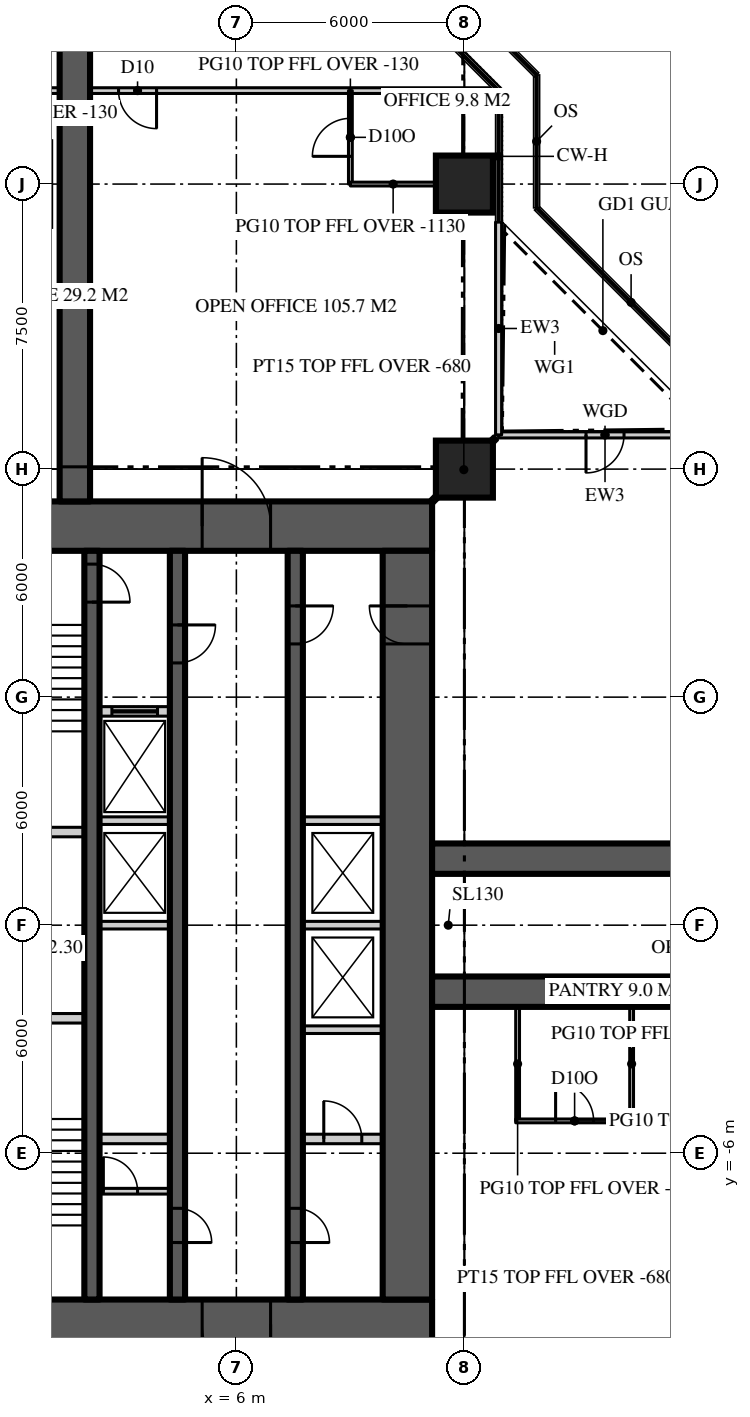
"""IFC4 building model, lengths in metres.
Left out: names, types, materials, properties, quantities, classifications, styles, units other than length and angle.
Written with IfcOpenShell. Run it as: python <this file> out.ifc"""

import sys

from ifc_helpers import new_model, si_unit, direction, frame, frame_2d, origin, origin_2d, place, context, subcontext, project, spatial, rectangle, extrude, element, fill, save


model = new_model("IFC4")
c1 = context("Model", 3, precision=1e-05, world=origin(), true_north=direction((0.0, 1.0)))
c2 = subcontext(c1, "Body", "Model", "MODEL_VIEW")
j1 = project(units=[si_unit("LENGTHUNIT", "METRE"), si_unit("PLANEANGLEUNIT", "RADIAN")], contexts=[c1])
p1 = place(None, origin())
s1 = spatial("IfcSite", under=j1, at=p1, CompositionType="ELEMENT")
p2 = place(p1, origin())
s2 = spatial("IfcBuilding", under=s1, at=p2, CompositionType="ELEMENT")
p3 = place(p2, frame((0.0, 0.0, 220.5)))
s3 = spatial("IfcBuildingStorey", under=s2, at=p3, CompositionType="ELEMENT", Elevation=220.5)
p4 = place(p3, frame((-11.15, 10.5, 0.0), z_axis=(0.0, 0.0, 1.0), x_axis=(1.0, 0.0, 0.0)))
e1 = element("IfcWall", 1, at=p4, inside=s3, PredefinedType="SHEAR", context=c2, shape_type="SweptSolid", body=[
    extrude(rectangle(XDim=22.3, YDim=1.3, at=frame_2d((11.15, 0.0))), origin(), (0.0, 0.0, 1.0), 3.9),
])
p5 = place(p4, frame((4.25, 0.0, 0.0)))
e2 = element("IfcOpeningElement", 2, at=p5, cuts=e1, PredefinedType="OPENING", context=c2, shape_type="SweptSolid", body=[
    extrude(rectangle(XDim=1.8, YDim=2.2, at=frame_2d((0.9, 1.1))), frame((0.0, 0.66, 0.0), z_axis=(0.0, -1.0, 0.0), x_axis=(1.0, 0.0, 0.0)), (0.0, 0.0, 1.0), 1.32),
])
p6 = place(p4, frame((16.25, 0.0, 0.0)))
e3 = element("IfcOpeningElement", 3, at=p6, cuts=e1, PredefinedType="OPENING", context=c2, shape_type="SweptSolid", body=[
    extrude(rectangle(XDim=1.8, YDim=2.2, at=frame_2d((0.9, 1.1))), frame((0.0, 0.66, 0.0), z_axis=(0.0, -1.0, 0.0), x_axis=(1.0, 0.0, 0.0)), (0.0, 0.0, 1.0), 1.32),
])
p7 = place(p3, frame((11.15, -10.5, 0.0), z_axis=(0.0, 0.0, 1.0), x_axis=(-1.0, 0.0, 0.0)))
e4 = element("IfcWall", 4, at=p7, inside=s3, PredefinedType="SHEAR", context=c2, shape_type="SweptSolid", body=[
    extrude(rectangle(XDim=22.3, YDim=1.3, at=frame_2d((11.15, 0.0))), origin(), (0.0, 0.0, 1.0), 3.9),
])
p8 = place(p7, frame((16.25, 0.0, 0.0)))
e5 = element("IfcOpeningElement", 5, at=p8, cuts=e4, PredefinedType="OPENING", context=c2, shape_type="SweptSolid", body=[
    extrude(rectangle(XDim=1.8, YDim=2.2, at=frame_2d((0.9, 1.1))), frame((0.0, 0.66, 0.0), z_axis=(0.0, -1.0, 0.0), x_axis=(1.0, 0.0, 0.0)), (0.0, 0.0, 1.0), 1.32),
])
p9 = place(p7, frame((4.25, 0.0, 0.0)))
e6 = element("IfcOpeningElement", 6, at=p9, cuts=e4, PredefinedType="OPENING", context=c2, shape_type="SweptSolid", body=[
    extrude(rectangle(XDim=1.8, YDim=2.2, at=frame_2d((0.9, 1.1))), frame((0.0, 0.66, 0.0), z_axis=(0.0, -1.0, 0.0), x_axis=(1.0, 0.0, 0.0)), (0.0, 0.0, 1.0), 1.32),
])
p10 = place(p3, frame((10.5, -9.85, 0.0), z_axis=(0.0, 0.0, 1.0), x_axis=(0.0, 1.0, 0.0)))
e7 = element("IfcWall", 7, at=p10, inside=s3, PredefinedType="SHEAR", context=c2, shape_type="SweptSolid", body=[
    extrude(rectangle(XDim=19.7, YDim=1.3, at=frame_2d((9.85, 0.0))), origin(), (0.0, 0.0, 1.0), 3.9),
])
p11 = place(p10, frame((17.25, 0.0, 0.0)))
e8 = element("IfcOpeningElement", 8, at=p11, cuts=e7, PredefinedType="OPENING", context=c2, shape_type="SweptSolid", body=[
    extrude(rectangle(XDim=1.0, YDim=2.2, at=frame_2d((0.5, 1.1))), frame((0.0, 0.66, 0.0), z_axis=(0.0, -1.0, 0.0), x_axis=(1.0, 0.0, 0.0)), (0.0, 0.0, 1.0), 1.32),
])
for number, where, z_axis, x_axis in (
    (9, (11.15, -1.75, 0.0), (0.0, 0.0, 1.0), (1.0, 0.0, 0.0)),
    (10, (11.15, 1.75, 0.0), (0.0, 0.0, 1.0), (1.0, 0.0, 0.0)),
    (11, (1.75, 11.15, 0.0), (0.0, 0.0, 1.0), (0.0, 1.0, 0.0)),
):
    element("IfcWall", number, at=place(p3, frame(where, z_axis=z_axis, x_axis=x_axis)), inside=s3, PredefinedType="SHEAR", context=c2, shape_type="SweptSolid", body=[
        extrude(rectangle(XDim=15.25, YDim=0.8, at=frame_2d((7.625, 0.0))), origin(), (0.0, 0.0, 1.0), 3.9),
    ])
for number, where, z_axis, x_axis in (
    (12, (12.0, 12.0, 0.0), (0.0, 0.0, 1.0), (1.0, 0.0, 0.0)),
    (13, (12.0, 19.5, 0.0), (0.0, 0.0, 1.0), (1.0, 0.0, 0.0)),
):
    element("IfcColumn", number, at=place(p3, frame(where, z_axis=z_axis, x_axis=x_axis)), inside=s3, PredefinedType="COLUMN", context=c2, shape_type="SweptSolid", body=[
        extrude(rectangle(XDim=1.5, YDim=1.5, at=origin_2d()), origin(), (0.0, 0.0, 1.0), 3.9),
    ])
p12 = place(p3, frame((18.5, 12.9, 0.0), z_axis=(0.0, 0.0, 1.0), x_axis=(-1.0, 0.0, 0.0)))
e14 = element("IfcWall", 14, at=p12, inside=s3, PredefinedType="SOLIDWALL", context=c2, shape_type="SweptSolid", body=[
    extrude(rectangle(XDim=5.6, YDim=0.16, at=frame_2d((2.8, 0.0))), origin(), (0.0, 0.0, 1.0), 3.77),
])
p13 = place(p12, frame((2.3, 0.0, 0.0)))
e15 = element("IfcOpeningElement", 15, at=p13, cuts=e14, PredefinedType="OPENING", context=c2, shape_type="SweptSolid", body=[
    extrude(rectangle(XDim=1.0, YDim=2.2, at=frame_2d((0.5, 1.1))), frame((0.0, 0.09, 0.0), z_axis=(0.0, -1.0, 0.0), x_axis=(1.0, 0.0, 0.0)), (0.0, 0.0, 1.0), 0.18),
])
p14 = place(p3, frame((12.9, 12.9, 0.0), z_axis=(0.0, 0.0, 1.0), x_axis=(0.0, 1.0, 0.0)))
e16 = element("IfcWall", 16, at=p14, inside=s3, PredefinedType="SOLIDWALL", context=c2, shape_type="SweptSolid", body=[
    extrude(rectangle(XDim=5.6, YDim=0.16, at=frame_2d((2.8, 0.0))), origin(), (0.0, 0.0, 1.0), 3.77),
])
p15 = place(p3, frame((7.55, 9.85, 0.0), z_axis=(0.0, 0.0, 1.0), x_axis=(0.0, -1.0, 0.0)))
e17 = element("IfcWall", 17, at=p15, inside=s3, PredefinedType="SHEAR", context=c2, shape_type="SweptSolid", body=[
    extrude(rectangle(XDim=19.7, YDim=0.4, at=frame_2d((9.85, 0.0))), origin(), (0.0, 0.0, 1.0), 3.9),
])
p16 = place(p15, frame((1.45, 0.0, 0.0)))
e18 = element("IfcOpeningElement", 18, at=p16, cuts=e17, PredefinedType="OPENING", context=c2, shape_type="SweptSolid", body=[
    extrude(rectangle(XDim=1.0, YDim=2.2, at=frame_2d((0.5, 1.1))), frame((0.0, 0.21, 0.0), z_axis=(0.0, -1.0, 0.0), x_axis=(1.0, 0.0, 0.0)), (0.0, 0.0, 1.0), 0.42),
])
p17 = place(p15, frame((17.3, 0.0, 0.0)))
e19 = element("IfcOpeningElement", 19, at=p17, cuts=e17, PredefinedType="OPENING", context=c2, shape_type="SweptSolid", body=[
    extrude(rectangle(XDim=0.9, YDim=2.1, at=frame_2d((0.45, 1.05))), frame((0.0, 0.21, 0.0), z_axis=(0.0, -1.0, 0.0), x_axis=(1.0, 0.0, 0.0)), (0.0, 0.0, 1.0), 0.42),
])
p18 = place(p3, frame((4.45, 9.85, 0.0), z_axis=(0.0, 0.0, 1.0), x_axis=(0.0, -1.0, 0.0)))
e20 = element("IfcWall", 20, at=p18, inside=s3, PredefinedType="SHEAR", context=c2, shape_type="SweptSolid", body=[
    extrude(rectangle(XDim=19.7, YDim=0.4, at=frame_2d((9.85, 0.0))), origin(), (0.0, 0.0, 1.0), 3.9),
])
p19 = place(p18, frame((1.95, 0.0, 0.0)))
e21 = element("IfcOpeningElement", 21, at=p19, cuts=e20, PredefinedType="OPENING", context=c2, shape_type="SweptSolid", body=[
    extrude(rectangle(XDim=1.0, YDim=2.2, at=frame_2d((0.5, 1.1))), frame((0.0, 0.21, 0.0), z_axis=(0.0, -1.0, 0.0), x_axis=(1.0, 0.0, 0.0)), (0.0, 0.0, 1.0), 0.42),
])
p20 = place(p18, frame((17.3, 0.0, 0.0)))
e22 = element("IfcOpeningElement", 22, at=p20, cuts=e20, PredefinedType="OPENING", context=c2, shape_type="SweptSolid", body=[
    extrude(rectangle(XDim=0.9, YDim=2.1, at=frame_2d((0.45, 1.05))), frame((0.0, 0.21, 0.0), z_axis=(0.0, -1.0, 0.0), x_axis=(1.0, 0.0, 0.0)), (0.0, 0.0, 1.0), 0.42),
])
p21 = place(p3, frame((2.2, 9.85, 0.0), z_axis=(0.0, 0.0, 1.0), x_axis=(0.0, -1.0, 0.0)))
e23 = element("IfcWall", 23, at=p21, inside=s3, PredefinedType="SHEAR", context=c2, shape_type="SweptSolid", body=[
    extrude(rectangle(XDim=19.7, YDim=0.4, at=frame_2d((9.85, 0.0))), origin(), (0.0, 0.0, 1.0), 3.9),
])
p22 = place(p21, frame((0.35, 0.0, 0.0)))
e24 = element("IfcOpeningElement", 24, at=p22, cuts=e23, PredefinedType="OPENING", context=c2, shape_type="SweptSolid", body=[
    extrude(rectangle(XDim=1.0, YDim=2.2, at=frame_2d((0.5, 1.1))), frame((0.0, 0.21, 0.0), z_axis=(0.0, -1.0, 0.0), x_axis=(1.0, 0.0, 0.0)), (0.0, 0.0, 1.0), 0.42),
])
p23 = place(p3, frame((2.4, 5.625, 0.0), z_axis=(0.0, 0.0, 1.0), x_axis=(1.0, 0.0, 0.0)))
e25 = element("IfcWall", 25, at=p23, inside=s3, PredefinedType="SOLIDWALL", context=c2, shape_type="SweptSolid", body=[
    extrude(rectangle(XDim=1.85, YDim=0.25, at=frame_2d((0.925, 0.0))), origin(), (0.0, 0.0, 1.0), 3.7),
])
p24 = place(p23, frame((0.325, 0.0, 0.0)))
e26 = element("IfcOpeningElement", 26, at=p24, cuts=e25, PredefinedType="OPENING", context=c2, shape_type="SweptSolid", body=[
    extrude(rectangle(XDim=1.2, YDim=2.2, at=frame_2d((0.6, 1.1))), frame((0.0, 0.135, 0.0), z_axis=(0.0, -1.0, 0.0), x_axis=(1.0, 0.0, 0.0)), (0.0, 0.0, 1.0), 0.27),
])
p25 = place(p3, frame((2.4, -5.625, 0.0), z_axis=(0.0, 0.0, 1.0), x_axis=(1.0, 0.0, 0.0)))
e27 = element("IfcWall", 27, at=p25, inside=s3, PredefinedType="SOLIDWALL", context=c2, shape_type="SweptSolid", body=[
    extrude(rectangle(XDim=1.85, YDim=0.25, at=frame_2d((0.925, 0.0))), origin(), (0.0, 0.0, 1.0), 3.7),
])
p26 = place(p3, frame((7.75, -5.625, 0.0), z_axis=(0.0, 0.0, 1.0), x_axis=(1.0, 0.0, 0.0)))
e28 = element("IfcWall", 28, at=p26, inside=s3, PredefinedType="SOLIDWALL", context=c2, shape_type="SweptSolid", body=[
    extrude(rectangle(XDim=2.1, YDim=0.25, at=frame_2d((1.05, 0.0))), origin(), (0.0, 0.0, 1.0), 3.7),
])
p27 = place(p26, frame((0.55, 0.0, 0.0)))
e29 = element("IfcOpeningElement", 29, at=p27, cuts=e28, PredefinedType="OPENING", context=c2, shape_type="SweptSolid", body=[
    extrude(rectangle(XDim=1.0, YDim=2.2, at=frame_2d((0.5, 1.1))), frame((0.0, 0.135, 0.0), z_axis=(0.0, -1.0, 0.0), x_axis=(1.0, 0.0, 0.0)), (0.0, 0.0, 1.0), 0.27),
])
for number, where, z_axis, x_axis in (
    (30, (-2.0, -2.45, 0.0), (0.0, 0.0, 1.0), (1.0, 0.0, 0.0)),
    (31, (-2.0, 2.45, 0.0), (0.0, 0.0, 1.0), (1.0, 0.0, 0.0)),
):
    element("IfcWall", number, at=place(p3, frame(where, z_axis=z_axis, x_axis=x_axis)), inside=s3, PredefinedType="SOLIDWALL", context=c2, shape_type="SweptSolid", body=[
        extrude(rectangle(XDim=4.0, YDim=0.25, at=frame_2d((2.0, 0.0))), origin(), (0.0, 0.0, 1.0), 3.7),
    ])
p28 = place(p3, frame((7.75, -2.75, 0.0), z_axis=(0.0, 0.0, 1.0), x_axis=(1.0, 0.0, 0.0)))
e32 = element("IfcWall", 32, at=p28, inside=s3, PredefinedType="SOLIDWALL", context=c2, shape_type="SweptSolid", body=[
    extrude(rectangle(XDim=2.1, YDim=0.2, at=frame_2d((1.05, 0.0))), origin(), (0.0, 0.0, 1.0), 3.7),
])
p29 = place(p3, frame((2.4, 0.0, 0.0), z_axis=(0.0, 0.0, 1.0), x_axis=(1.0, 0.0, 0.0)))
e33 = element("IfcWall", 33, at=p29, inside=s3, PredefinedType="SOLIDWALL", context=c2, shape_type="SweptSolid", body=[
    extrude(rectangle(XDim=1.85, YDim=0.2, at=frame_2d((0.925, 0.0))), origin(), (0.0, 0.0, 1.0), 3.7),
])
p30 = place(p3, frame((7.75, 0.0, 0.0), z_axis=(0.0, 0.0, 1.0), x_axis=(1.0, 0.0, 0.0)))
e34 = element("IfcWall", 34, at=p30, inside=s3, PredefinedType="SOLIDWALL", context=c2, shape_type="SweptSolid", body=[
    extrude(rectangle(XDim=2.1, YDim=0.2, at=frame_2d((1.05, 0.0))), origin(), (0.0, 0.0, 1.0), 3.7),
])
p31 = place(p3, frame((2.4, 2.75, 0.0), z_axis=(0.0, 0.0, 1.0), x_axis=(1.0, 0.0, 0.0)))
e35 = element("IfcWall", 35, at=p31, inside=s3, PredefinedType="SOLIDWALL", context=c2, shape_type="SweptSolid", body=[
    extrude(rectangle(XDim=1.85, YDim=0.2, at=frame_2d((0.925, 0.0))), origin(), (0.0, 0.0, 1.0), 3.7),
])
p32 = place(p3, frame((7.75, 2.75, 0.0), z_axis=(0.0, 0.0, 1.0), x_axis=(1.0, 0.0, 0.0)))
e36 = element("IfcWall", 36, at=p32, inside=s3, PredefinedType="SOLIDWALL", context=c2, shape_type="SweptSolid", body=[
    extrude(rectangle(XDim=2.1, YDim=0.2, at=frame_2d((1.05, 0.0))), origin(), (0.0, 0.0, 1.0), 3.7),
])
for number, where, z_axis, x_axis in (
    (37, (13.4, -2.15, 0.0), (0.0, 0.0, 1.0), (0.0, -1.0, 0.0)),
    (38, (16.4, -2.15, 0.0), (0.0, 0.0, 1.0), (0.0, -1.0, 0.0)),
):
    element("IfcWall", number, at=place(p3, frame(where, z_axis=z_axis, x_axis=x_axis)), inside=s3, PredefinedType="PARTITIONING", context=c2, shape_type="SweptSolid", body=[
        extrude(rectangle(XDim=3.0, YDim=0.1, at=frame_2d((1.5, 0.0))), origin(), (0.0, 0.0, 1.0), 3.77),
    ])
p33 = place(p3, frame((13.35, -5.15, 0.0), z_axis=(0.0, 0.0, 1.0), x_axis=(1.0, 0.0, 0.0)))
e39 = element("IfcWall", 39, at=p33, inside=s3, PredefinedType="PARTITIONING", context=c2, shape_type="SweptSolid", body=[
    extrude(rectangle(XDim=3.1, YDim=0.1, at=frame_2d((1.55, 0.0))), origin(), (0.0, 0.0, 1.0), 3.77),
])
p34 = place(p33, frame((1.05, 0.0, 0.0)))
e40 = element("IfcOpeningElement", 40, at=p34, cuts=e39, PredefinedType="OPENING", context=c2, shape_type="SweptSolid", body=[
    extrude(rectangle(XDim=1.0, YDim=2.2, at=frame_2d((0.5, 1.1))), frame((0.0, 0.06, 0.0), z_axis=(0.0, -1.0, 0.0), x_axis=(1.0, 0.0, 0.0)), (0.0, 0.0, 1.0), 0.12),
])
p35 = place(p3, frame((12.786, 21.959, 0.0), z_axis=(0.0, 0.0, 1.0), x_axis=(-1.0, 0.0, 0.0)))
e41 = element("IfcWall", 41, at=p35, inside=s3, PredefinedType="PARTITIONING", context=c2, shape_type="SweptSolid", body=[
    extrude(rectangle(XDim=25.573, YDim=0.15, at=frame_2d((12.786, 0.0))), origin(), (0.0, 0.0, 1.0), 3.77),
])
p36 = place(p35, frame((15.687, 0.0, 0.0)))
e42 = element("IfcOpeningElement", 42, at=p36, cuts=e41, PredefinedType="OPENING", context=c2, shape_type="SweptSolid", body=[
    extrude(rectangle(XDim=1.0, YDim=2.2, at=frame_2d((0.5, 1.1))), frame((0.0, 0.085, 0.0), z_axis=(0.0, -1.0, 0.0), x_axis=(1.0, 0.0, 0.0)), (0.0, 0.0, 1.0), 0.17),
])
p37 = place(p35, frame((8.886, 0.0, 0.0)))
e43 = element("IfcOpeningElement", 43, at=p37, cuts=e41, PredefinedType="OPENING", context=c2, shape_type="SweptSolid", body=[
    extrude(rectangle(XDim=1.0, YDim=2.2, at=frame_2d((0.5, 1.1))), frame((0.0, 0.085, 0.0), z_axis=(0.0, -1.0, 0.0), x_axis=(1.0, 0.0, 0.0)), (0.0, 0.0, 1.0), 0.17),
])
p38 = place(p3, frame((9.0, 19.5, 0.0), z_axis=(0.0, 0.0, 1.0), x_axis=(0.0, 1.0, 0.0)))
e44 = element("IfcWall", 44, at=p38, inside=s3, PredefinedType="PARTITIONING", context=c2, shape_type="SweptSolid", body=[
    extrude(rectangle(XDim=2.459, YDim=0.1, at=frame_2d((1.229, 0.0))), origin(), (0.0, 0.0, 1.0), 3.77),
])
p39 = place(p38, frame((0.729, 0.0, 0.0)))
e45 = element("IfcOpeningElement", 45, at=p39, cuts=e44, PredefinedType="OPENING", context=c2, shape_type="SweptSolid", body=[
    extrude(rectangle(XDim=1.0, YDim=2.2, at=frame_2d((0.5, 1.1))), frame((0.0, 0.06, 0.0), z_axis=(0.0, -1.0, 0.0), x_axis=(1.0, 0.0, 0.0)), (0.0, 0.0, 1.0), 0.12),
])
p40 = place(p3, frame((9.0, 19.5, 0.0), z_axis=(0.0, 0.0, 1.0), x_axis=(1.0, 0.0, 0.0)))
e46 = element("IfcWall", 46, at=p40, inside=s3, PredefinedType="PARTITIONING", context=c2, shape_type="SweptSolid", body=[
    extrude(rectangle(XDim=2.25, YDim=0.1, at=frame_2d((1.125, 0.0))), origin(), (0.0, 0.0, 1.0), 2.77),
])
p41 = place(p3, frame((11.15, 11.15, 0.0), z_axis=(0.0, 0.0, 1.0), x_axis=(0.707106781187, 0.707106781187, 0.0)))
e47 = element("IfcWall", 47, at=p41, inside=s3, PredefinedType="PARTITIONING", context=c2, shape_type="SweptSolid", body=[
    extrude(rectangle(XDim=2.362, YDim=0.15, at=frame_2d((1.181, 0.0))), origin(), (0.0, 0.0, 1.0), 3.22),
])
p42 = place(p3, frame((2.4, -7.0, 0.0), z_axis=(0.0, 0.0, 1.0), x_axis=(1.0, 0.0, 0.0)))
e48 = element("IfcWall", 48, at=p42, inside=s3, PredefinedType="SOLIDWALL", context=c2, shape_type="SweptSolid", body=[
    extrude(rectangle(XDim=1.85, YDim=0.15, at=frame_2d((0.925, 0.0))), origin(), (0.0, 0.0, 1.0), 3.77),
])
p43 = place(p42, frame((0.1, 0.0, 0.0)))
e49 = element("IfcOpeningElement", 49, at=p43, cuts=e48, PredefinedType="OPENING", context=c2, shape_type="SweptSolid", body=[
    extrude(rectangle(XDim=0.9, YDim=2.1, at=frame_2d((0.45, 1.05))), frame((0.0, 0.085, 0.0), z_axis=(0.0, -1.0, 0.0), x_axis=(1.0, 0.0, 0.0)), (0.0, 0.0, 1.0), 0.17),
])
p44 = place(p13, origin())
e50 = element("IfcDoor", 50, at=p44, inside=s3, OperationType="SINGLE_SWING_RIGHT", PredefinedType="DOOR", context=c2, shape_type="SweptSolid", body=[
    extrude(rectangle(XDim=1.0, YDim=2.2, at=frame_2d((0.5, 1.1))), frame((0.0, 0.025, 0.0), z_axis=(0.0, -1.0, 0.0), x_axis=(1.0, 0.0, 0.0)), (0.0, 0.0, 1.0), 0.05),
])
fill(e15, e50)
p45 = place(p6, origin())
e51 = element("IfcDoor", 51, at=p45, inside=s3, OperationType="DOUBLE_DOOR_DOUBLE_SWING", PredefinedType="DOOR", context=c2, shape_type="SweptSolid", body=[
    extrude(rectangle(XDim=1.8, YDim=2.2, at=frame_2d((0.9, 1.1))), frame((0.0, 0.025, 0.0), z_axis=(0.0, -1.0, 0.0), x_axis=(1.0, 0.0, 0.0)), (0.0, 0.0, 1.0), 0.05),
])
fill(e3, e51)
p46 = place(p9, origin())
e52 = element("IfcDoor", 52, at=p46, inside=s3, OperationType="DOUBLE_DOOR_DOUBLE_SWING", PredefinedType="DOOR", context=c2, shape_type="SweptSolid", body=[
    extrude(rectangle(XDim=1.8, YDim=2.2, at=frame_2d((0.9, 1.1))), frame((0.0, 0.025, 0.0), z_axis=(0.0, -1.0, 0.0), x_axis=(1.0, 0.0, 0.0)), (0.0, 0.0, 1.0), 0.05),
])
fill(e6, e52)
p47 = place(p16, origin())
e53 = element("IfcDoor", 53, at=p47, inside=s3, OperationType="SINGLE_SWING_LEFT", PredefinedType="DOOR", context=c2, shape_type="SweptSolid", body=[
    extrude(rectangle(XDim=1.0, YDim=2.2, at=frame_2d((0.5, 1.1))), frame((0.0, 0.025, 0.0), z_axis=(0.0, -1.0, 0.0), x_axis=(1.0, 0.0, 0.0)), (0.0, 0.0, 1.0), 0.05),
])
fill(e18, e53)
p48 = place(p11, origin())
e54 = element("IfcDoor", 54, at=p48, inside=s3, OperationType="SINGLE_SWING_RIGHT", PredefinedType="DOOR", context=c2, shape_type="SweptSolid", body=[
    extrude(rectangle(XDim=1.0, YDim=2.2, at=frame_2d((0.5, 1.1))), frame((0.0, 0.025, 0.0), z_axis=(0.0, -1.0, 0.0), x_axis=(1.0, 0.0, 0.0)), (0.0, 0.0, 1.0), 0.05),
])
fill(e8, e54)
p49 = place(p19, origin())
e55 = element("IfcDoor", 55, at=p49, inside=s3, OperationType="SINGLE_SWING_LEFT", PredefinedType="DOOR", context=c2, shape_type="SweptSolid", body=[
    extrude(rectangle(XDim=1.0, YDim=2.2, at=frame_2d((0.5, 1.1))), frame((0.0, 0.025, 0.0), z_axis=(0.0, -1.0, 0.0), x_axis=(1.0, 0.0, 0.0)), (0.0, 0.0, 1.0), 0.05),
])
fill(e21, e55)
p50 = place(p22, origin())
e56 = element("IfcDoor", 56, at=p50, inside=s3, OperationType="SINGLE_SWING_RIGHT", PredefinedType="DOOR", context=c2, shape_type="SweptSolid", body=[
    extrude(rectangle(XDim=1.0, YDim=2.2, at=frame_2d((0.5, 1.1))), frame((0.0, 0.025, 0.0), z_axis=(0.0, -1.0, 0.0), x_axis=(1.0, 0.0, 0.0)), (0.0, 0.0, 1.0), 0.05),
])
fill(e24, e56)
p51 = place(p17, origin())
e57 = element("IfcDoor", 57, at=p51, inside=s3, OperationType="SINGLE_SWING_RIGHT", PredefinedType="DOOR", context=c2, shape_type="SweptSolid", body=[
    extrude(rectangle(XDim=0.9, YDim=2.1, at=frame_2d((0.45, 1.05))), frame((0.0, 0.025, 0.0), z_axis=(0.0, -1.0, 0.0), x_axis=(1.0, 0.0, 0.0)), (0.0, 0.0, 1.0), 0.05),
])
fill(e19, e57)
p52 = place(p20, origin())
e58 = element("IfcDoor", 58, at=p52, inside=s3, OperationType="SINGLE_SWING_RIGHT", PredefinedType="DOOR", context=c2, shape_type="SweptSolid", body=[
    extrude(rectangle(XDim=0.9, YDim=2.1, at=frame_2d((0.45, 1.05))), frame((0.0, 0.025, 0.0), z_axis=(0.0, -1.0, 0.0), x_axis=(1.0, 0.0, 0.0)), (0.0, 0.0, 1.0), 0.05),
])
fill(e22, e58)
p53 = place(p24, origin())
e59 = element("IfcDoor", 59, at=p53, inside=s3, OperationType="SLIDING_TO_LEFT", PredefinedType="DOOR", context=c2, shape_type="SweptSolid", body=[
    extrude(rectangle(XDim=1.2, YDim=2.2, at=frame_2d((0.6, 1.1))), frame((0.0, 0.025, 0.0), z_axis=(0.0, -1.0, 0.0), x_axis=(1.0, 0.0, 0.0)), (0.0, 0.0, 1.0), 0.05),
])
fill(e26, e59)
p54 = place(p34, origin())
e60 = element("IfcDoor", 60, at=p54, inside=s3, OperationType="SINGLE_SWING_LEFT", PredefinedType="DOOR", context=c2, shape_type="SweptSolid", body=[
    extrude(rectangle(XDim=1.0, YDim=2.2, at=frame_2d((0.5, 1.1))), frame((0.0, 0.025, 0.0), z_axis=(0.0, -1.0, 0.0), x_axis=(1.0, 0.0, 0.0)), (0.0, 0.0, 1.0), 0.05),
])
fill(e40, e60)
p55 = place(p37, origin())
e61 = element("IfcDoor", 61, at=p55, inside=s3, OperationType="SINGLE_SWING_LEFT", PredefinedType="DOOR", context=c2, shape_type="SweptSolid", body=[
    extrude(rectangle(XDim=1.0, YDim=2.2, at=frame_2d((0.5, 1.1))), frame((0.0, 0.025, 0.0), z_axis=(0.0, -1.0, 0.0), x_axis=(1.0, 0.0, 0.0)), (0.0, 0.0, 1.0), 0.05),
])
fill(e43, e61)
p56 = place(p39, origin())
e62 = element("IfcDoor", 62, at=p56, inside=s3, OperationType="SINGLE_SWING_LEFT", PredefinedType="DOOR", context=c2, shape_type="SweptSolid", body=[
    extrude(rectangle(XDim=1.0, YDim=2.2, at=frame_2d((0.5, 1.1))), frame((0.0, 0.025, 0.0), z_axis=(0.0, -1.0, 0.0), x_axis=(1.0, 0.0, 0.0)), (0.0, 0.0, 1.0), 0.05),
])
fill(e45, e62)
p57 = place(p27, origin())
e63 = element("IfcDoor", 63, at=p57, inside=s3, OperationType="SINGLE_SWING_LEFT", PredefinedType="DOOR", context=c2, shape_type="SweptSolid", body=[
    extrude(rectangle(XDim=1.0, YDim=2.2, at=frame_2d((0.5, 1.1))), frame((0.0, 0.025, 0.0), z_axis=(0.0, -1.0, 0.0), x_axis=(1.0, 0.0, 0.0)), (0.0, 0.0, 1.0), 0.05),
])
fill(e29, e63)
p58 = place(p43, origin())
e64 = element("IfcDoor", 64, at=p58, inside=s3, OperationType="SINGLE_SWING_LEFT", PredefinedType="DOOR", context=c2, shape_type="SweptSolid", body=[
    extrude(rectangle(XDim=0.9, YDim=2.1, at=frame_2d((0.45, 1.05))), frame((0.0, 0.025, 0.0), z_axis=(0.0, -1.0, 0.0), x_axis=(1.0, 0.0, 0.0)), (0.0, 0.0, 1.0), 0.05),
])
fill(e49, e64)
save(model, sys.argv[1])
